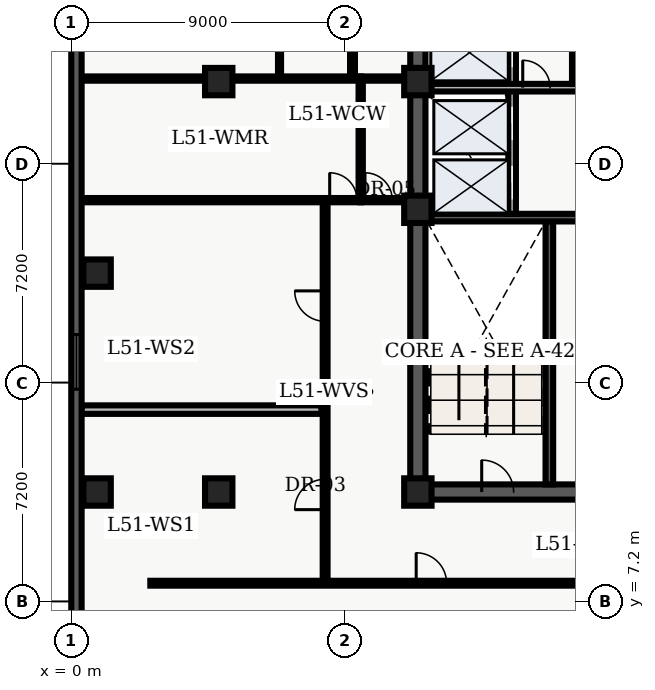
"""IFC4 building model, lengths in metres.
Left out: names, types, materials, properties, quantities, classifications, styles, units other than length and angle.
Written with IfcOpenShell. Run it as: python <this file> out.ifc"""

import sys

from ifc_helpers import new_model, entity, si_unit, converted_unit, direction, frame, origin_with_axes, origin_2d_with_axis, place, context, subcontext, project, spatial, polyline, rectangle, outline, extrude, element, fill, save


model = new_model("IFC4")
c1 = context("Model", 3, precision=1e-05, world=origin_with_axes(), true_north=direction((0.0, 1.0)))
c2 = subcontext(c1, "Body", "Model", "MODEL_VIEW")
j1 = project(units=[si_unit("LENGTHUNIT", "METRE"), converted_unit("PLANEANGLEUNIT", "DEGREE", entity("IfcPlaneAngleMeasure", 0.017), si_unit("PLANEANGLEUNIT", "RADIAN"), dimensions=[0, 0, 0, 0, 0, 0, 0])], contexts=[c1])
p1 = place(None, origin_with_axes())
s1 = spatial("IfcSite", under=j1, at=p1, CompositionType="ELEMENT")
p2 = place(p1, origin_with_axes())
s2 = spatial("IfcBuilding", under=s1, at=p2, CompositionType="ELEMENT")
p3 = place(p2, frame((0.0, 0.0, 208.2), z_axis=(0.0, 0.0, 1.0), x_axis=(1.0, 0.0, 0.0)))
s3 = spatial("IfcBuildingStorey", under=s2, at=p3, CompositionType="ELEMENT", Elevation=208.2)
p4 = place(p3, frame((11.4, 10.8, 0.0), z_axis=(0.0, 0.0, 1.0), x_axis=(0.0, 1.0, 0.0)))
e1 = element("IfcWall", 1, at=p4, inside=s3, PredefinedType="SHEAR", context=c2, shape_type="SweptSolid", body=[
    extrude(outline(polyline([(0.0, -0.25), (27.0, -0.25), (27.0, 0.25), (0.0, 0.25), (0.0, -0.25)])), origin_with_axes(), (0.0, 0.0, 1.0), 3.66),
])
p5 = place(p3, frame((11.4, 10.8, 0.0), z_axis=(0.0, 0.0, 1.0), x_axis=(1.0, 0.0, 0.0)))
e2 = element("IfcWall", 2, at=p5, inside=s3, PredefinedType="SHEAR", context=c2, shape_type="SweptSolid", body=[
    extrude(outline(polyline([(0.0, -0.25), (7.2, -0.25), (7.2, 0.25), (0.0, 0.25), (0.0, -0.25)])), origin_with_axes(), (0.0, 0.0, 1.0), 3.66),
])
p6 = place(p5, frame((2.625, 0.0, 0.0), z_axis=(0.0, 0.0, 1.0), x_axis=(1.0, 0.0, 0.0)))
e3 = element("IfcOpeningElement", 3, at=p6, cuts=e2, PredefinedType="OPENING", context=c2, shape_type="SweptSolid", body=[
    extrude(rectangle(XDim=1.05, YDim=0.52, at=origin_2d_with_axis()), origin_with_axes(), (0.0, 0.0, 1.0), 2.15),
])
p7 = place(p3, frame((15.725, 11.05, 0.0), z_axis=(0.0, 0.0, 1.0), x_axis=(0.0, 1.0, 0.0)))
e4 = element("IfcWall", 4, at=p7, inside=s3, PredefinedType="SHEAR", context=c2, shape_type="SweptSolid", body=[
    extrude(outline(polyline([(0.0, -0.125), (8.65, -0.125), (8.65, 0.125), (0.0, 0.125), (0.0, -0.125)])), origin_with_axes(), (0.0, 0.0, 1.0), 3.66),
])
p8 = place(p3, frame((11.65, 19.825, 0.0), z_axis=(0.0, 0.0, 1.0), x_axis=(1.0, 0.0, 0.0)))
e5 = element("IfcWall", 5, at=p8, inside=s3, PredefinedType="SHEAR", context=c2, shape_type="SweptSolid", body=[
    extrude(outline(polyline([(0.0, -0.125), (6.7, -0.125), (6.7, 0.125), (0.0, 0.125), (0.0, -0.125)])), origin_with_axes(), (0.0, 0.0, 1.0), 3.66),
])
p9 = place(p3, frame((14.5, 19.95, 0.0), z_axis=(0.0, 0.0, 1.0), x_axis=(0.0, 1.0, 0.0)))
e6 = element("IfcWall", 6, at=p9, inside=s3, PredefinedType="SOLIDWALL", context=c2, shape_type="SweptSolid", body=[
    extrude(outline(polyline([(0.0, -0.125), (6.25, -0.125), (6.25, 0.125), (0.0, 0.125), (0.0, -0.125)])), origin_with_axes(), (0.0, 0.0, 1.0), 2.7),
])
p10 = place(p9, frame((1.025, 0.0, 0.0), z_axis=(0.0, 0.0, 1.0), x_axis=(1.0, 0.0, 0.0)))
e7 = element("IfcOpeningElement", 7, at=p10, cuts=e6, PredefinedType="OPENING", context=c2, shape_type="SweptSolid", body=[
    extrude(rectangle(XDim=1.1, YDim=0.27, at=origin_2d_with_axis()), origin_with_axes(), (0.0, 0.0, 1.0), 2.15),
])
p11 = place(p9, frame((2.975, 0.0, 0.0), z_axis=(0.0, 0.0, 1.0), x_axis=(1.0, 0.0, 0.0)))
e8 = element("IfcOpeningElement", 8, at=p11, cuts=e6, PredefinedType="OPENING", context=c2, shape_type="SweptSolid", body=[
    extrude(rectangle(XDim=1.1, YDim=0.27, at=origin_2d_with_axis()), origin_with_axes(), (0.0, 0.0, 1.0), 2.15),
])
p12 = place(p9, frame((5.425, 0.0, 0.0), z_axis=(0.0, 0.0, 1.0), x_axis=(1.0, 0.0, 0.0)))
e9 = element("IfcOpeningElement", 9, at=p12, cuts=e6, PredefinedType="OPENING", context=c2, shape_type="SweptSolid", body=[
    extrude(rectangle(XDim=1.2, YDim=0.27, at=origin_2d_with_axis()), origin_with_axes(), (0.0, 0.0, 1.0), 2.15),
])
p13 = place(p3, frame((11.7, 24.1, 0.0), z_axis=(0.0, 0.0, 1.0), x_axis=(1.0, 0.0, 0.0)))
e10 = element("IfcWall", 10, at=p13, inside=s3, PredefinedType="SOLIDWALL", context=c2, shape_type="SweptSolid", body=[
    extrude(outline(polyline([(0.0, -0.125), (6.6, -0.125), (6.6, 0.125), (0.0, 0.125), (0.0, -0.125)])), origin_with_axes(), (0.0, 0.0, 1.0), 2.7),
])
p14 = place(p13, frame((3.6, 0.0, 0.0), z_axis=(0.0, 0.0, 1.0), x_axis=(1.0, 0.0, 0.0)))
e11 = element("IfcOpeningElement", 11, at=p14, cuts=e10, PredefinedType="OPENING", context=c2, shape_type="SweptSolid", body=[
    extrude(rectangle(XDim=0.9, YDim=0.27, at=origin_2d_with_axis()), origin_with_axes(), (0.0, 0.0, 1.0), 2.15),
])
p15 = place(p13, frame((5.65, 0.0, 0.0), z_axis=(0.0, 0.0, 1.0), x_axis=(1.0, 0.0, 0.0)))
e12 = element("IfcOpeningElement", 12, at=p15, cuts=e10, PredefinedType="OPENING", context=c2, shape_type="SweptSolid", body=[
    extrude(rectangle(XDim=0.9, YDim=0.27, at=origin_2d_with_axis()), origin_with_axes(), (0.0, 0.0, 1.0), 2.15),
])
for number, where, z_axis, x_axis in (
    (13, (11.4, 10.8, 0.0), (0.0, 0.0, 1.0), (1.0, 0.0, 0.0)),
    (14, (11.4, 20.1, 0.0), (0.0, 0.0, 1.0), (1.0, 0.0, 0.0)),
    (15, (11.4, 24.3, 0.0), (0.0, 0.0, 1.0), (1.0, 0.0, 0.0)),
    (16, (4.85, 10.8, 0.0), (0.0, 0.0, 1.0), (1.0, 0.0, 0.0)),
    (17, (4.85, 24.3, 0.0), (0.0, 0.0, 1.0), (1.0, 0.0, 0.0)),
    (18, (0.85, 10.8, 0.0), (0.0, 0.0, 1.0), (1.0, 0.0, 0.0)),
    (19, (0.85, 18.0, 0.0), (0.0, 0.0, 1.0), (1.0, 0.0, 0.0)),
):
    element("IfcColumn", number, at=place(p3, frame(where, z_axis=z_axis, x_axis=x_axis)), inside=s3, PredefinedType="COLUMN", context=c2, shape_type="SweptSolid", body=[
        extrude(rectangle(XDim=0.9, YDim=0.9, at=origin_2d_with_axis()), origin_with_axes(), (0.0, 0.0, 1.0), 3.9),
    ])
p16 = place(p3, frame((16.55, 24.22, 0.0), z_axis=(0.0, 0.0, 1.0), x_axis=(0.0, 1.0, 0.0)))
e20 = element("IfcWall", 20, at=p16, inside=s3, PredefinedType="PARTITIONING", context=c2, shape_type="SweptSolid", body=[
    extrude(outline(polyline([(0.0, -0.08), (1.98, -0.08), (1.98, 0.08), (0.0, 0.08), (0.0, -0.08)])), origin_with_axes(), (0.0, 0.0, 1.0), 2.7),
])
p17 = place(p3, frame((15.84, 15.35, 0.0), z_axis=(0.0, 0.0, 1.0), x_axis=(1.0, 0.0, 0.0)))
e21 = element("IfcWall", 21, at=p17, inside=s3, PredefinedType="PARTITIONING", context=c2, shape_type="SweptSolid", body=[
    extrude(outline(polyline([(0.0, -0.08), (2.46, -0.08), (2.46, 0.08), (0.0, 0.08), (0.0, -0.08)])), origin_with_axes(), (0.0, 0.0, 1.0), 2.7),
])
p18 = place(p3, frame((9.52, 20.4, 0.0), z_axis=(0.0, 0.0, 1.0), x_axis=(0.0, 1.0, 0.0)))
e22 = element("IfcWall", 22, at=p18, inside=s3, PredefinedType="PARTITIONING", context=c2, shape_type="SweptSolid", body=[
    extrude(outline(polyline([(0.0, -0.07), (4.0, -0.07), (4.0, 0.07), (0.0, 0.07), (0.0, -0.07)])), origin_with_axes(), (0.0, 0.0, 1.0), 2.7),
])
p19 = place(p3, frame((9.52, 20.4, 0.0), z_axis=(0.0, 0.0, 1.0), x_axis=(1.0, 0.0, 0.0)))
e23 = element("IfcWall", 23, at=p19, inside=s3, PredefinedType="PARTITIONING", context=c2, shape_type="SweptSolid", body=[
    extrude(outline(polyline([(0.0, -0.07), (1.58, -0.07), (1.58, 0.07), (0.0, 0.07), (0.0, -0.07)])), origin_with_axes(), (0.0, 0.0, 1.0), 2.7),
])
p20 = place(p19, frame((0.59, 0.0, 0.0), z_axis=(0.0, 0.0, 1.0), x_axis=(1.0, 0.0, 0.0)))
e24 = element("IfcOpeningElement", 24, at=p20, cuts=e23, PredefinedType="OPENING", context=c2, shape_type="SweptSolid", body=[
    extrude(rectangle(XDim=0.9, YDim=0.16, at=origin_2d_with_axis()), origin_with_axes(), (0.0, 0.0, 1.0), 2.15),
])
p21 = place(p3, frame((9.52, 24.4, 0.0), z_axis=(0.0, 0.0, 1.0), x_axis=(1.0, 0.0, 0.0)))
e25 = element("IfcWall", 25, at=p21, inside=s3, PredefinedType="PARTITIONING", context=c2, shape_type="SweptSolid", body=[
    extrude(outline(polyline([(0.0, -0.07), (1.58, -0.07), (1.58, 0.07), (0.0, 0.07), (0.0, -0.07)])), origin_with_axes(), (0.0, 0.0, 1.0), 2.7),
])
p22 = place(p3, frame((2.6, 7.8, 0.0), z_axis=(0.0, 0.0, 1.0), x_axis=(1.0, 0.0, 0.0)))
e26 = element("IfcWall", 26, at=p22, inside=s3, PredefinedType="PARTITIONING", context=c2, shape_type="SweptSolid", body=[
    extrude(outline(polyline([(0.0, -0.08), (18.55, -0.08), (18.55, 0.08), (0.0, 0.08), (0.0, -0.08)])), origin_with_axes(), (0.0, 0.0, 1.0), 2.7),
])
p23 = place(p22, frame((9.245, 0.0, 0.0), z_axis=(0.0, 0.0, 1.0), x_axis=(1.0, 0.0, 0.0)))
e27 = element("IfcOpeningElement", 27, at=p23, cuts=e26, PredefinedType="OPENING", context=c2, shape_type="SweptSolid", body=[
    extrude(rectangle(XDim=1.0, YDim=0.18, at=origin_2d_with_axis()), origin_with_axes(), (0.0, 0.0, 1.0), 2.15),
])
p24 = place(p3, frame((8.35, 7.8, 0.0), z_axis=(0.0, 0.0, 1.0), x_axis=(0.0, 1.0, 0.0)))
e28 = element("IfcWall", 28, at=p24, inside=s3, PredefinedType="PARTITIONING", context=c2, shape_type="SweptSolid", body=[
    extrude(outline(polyline([(0.0, -0.08), (12.6, -0.08), (12.6, 0.08), (0.0, 0.08), (0.0, -0.08)])), origin_with_axes(), (0.0, 0.0, 1.0), 2.7),
])
p25 = place(p24, frame((2.92, 0.0, 0.0), z_axis=(0.0, 0.0, 1.0), x_axis=(1.0, 0.0, 0.0)))
e29 = element("IfcOpeningElement", 29, at=p25, cuts=e28, PredefinedType="OPENING", context=c2, shape_type="SweptSolid", body=[
    extrude(rectangle(XDim=1.0, YDim=0.18, at=origin_2d_with_axis()), origin_with_axes(), (0.0, 0.0, 1.0), 2.15),
])
p26 = place(p24, frame((9.115, 0.0, 0.0), z_axis=(0.0, 0.0, 1.0), x_axis=(1.0, 0.0, 0.0)))
e30 = element("IfcOpeningElement", 30, at=p26, cuts=e28, PredefinedType="OPENING", context=c2, shape_type="SweptSolid", body=[
    extrude(rectangle(XDim=1.0, YDim=0.18, at=origin_2d_with_axis()), origin_with_axes(), (0.0, 0.0, 1.0), 2.15),
])
p27 = place(p3, frame((9.25, 24.4, 0.0), z_axis=(0.0, 0.0, 1.0), x_axis=(0.0, 1.0, 0.0)))
e31 = element("IfcWall", 31, at=p27, inside=s3, PredefinedType="PARTITIONING", context=c2, shape_type="SweptSolid", body=[
    extrude(outline(polyline([(0.0, -0.08), (16.1, -0.08), (16.1, 0.08), (0.0, 0.08), (0.0, -0.08)])), origin_with_axes(), (0.0, 0.0, 1.0), 2.7),
])
p28 = place(p27, frame((5.51, 0.0, 0.0), z_axis=(0.0, 0.0, 1.0), x_axis=(1.0, 0.0, 0.0)))
e32 = element("IfcOpeningElement", 32, at=p28, cuts=e31, PredefinedType="OPENING", context=c2, shape_type="SweptSolid", body=[
    extrude(rectangle(XDim=1.0, YDim=0.18, at=origin_2d_with_axis()), origin_with_axes(), (0.0, 0.0, 1.0), 2.15),
])
p29 = place(p27, frame((13.455, 0.0, 0.0), z_axis=(0.0, 0.0, 1.0), x_axis=(1.0, 0.0, 0.0)))
e33 = element("IfcOpeningElement", 33, at=p29, cuts=e31, PredefinedType="OPENING", context=c2, shape_type="SweptSolid", body=[
    extrude(rectangle(XDim=1.0, YDim=0.18, at=origin_2d_with_axis()), origin_with_axes(), (0.0, 0.0, 1.0), 2.15),
])
p30 = place(p3, frame((0.335, 20.4, 0.0), z_axis=(0.0, 0.0, 1.0), x_axis=(1.0, 0.0, 0.0)))
e34 = element("IfcWall", 34, at=p30, inside=s3, PredefinedType="PARTITIONING", context=c2, shape_type="SweptSolid", body=[
    extrude(outline(polyline([(0.0, -0.07), (9.185, -0.07), (9.185, 0.07), (0.0, 0.07), (0.0, -0.07)])), origin_with_axes(), (0.0, 0.0, 1.0), 2.7),
])
p31 = place(p30, frame((8.615, 0.0, 0.0), z_axis=(0.0, 0.0, 1.0), x_axis=(1.0, 0.0, 0.0)))
e35 = element("IfcOpeningElement", 35, at=p31, cuts=e34, PredefinedType="OPENING", context=c2, shape_type="SweptSolid", body=[
    extrude(rectangle(XDim=0.9, YDim=0.16, at=origin_2d_with_axis()), origin_with_axes(), (0.0, 0.0, 1.0), 2.15),
])
p32 = place(p3, frame((0.335, 24.4, 0.0), z_axis=(0.0, 0.0, 1.0), x_axis=(1.0, 0.0, 0.0)))
e36 = element("IfcWall", 36, at=p32, inside=s3, PredefinedType="PARTITIONING", context=c2, shape_type="SweptSolid", body=[
    extrude(outline(polyline([(0.0, -0.07), (9.185, -0.07), (9.185, 0.07), (0.0, 0.07), (0.0, -0.07)])), origin_with_axes(), (0.0, 0.0, 1.0), 2.7),
])
p33 = place(p3, frame((0.335, 13.51, 0.0), z_axis=(0.0, 0.0, 1.0), x_axis=(1.0, 0.0, 0.0)))
e37 = element("IfcWall", 37, at=p33, inside=s3, PredefinedType="PARTITIONING", context=c2, shape_type="SweptSolid", body=[
    extrude(outline(polyline([(0.0, -0.14), (7.895, -0.14), (7.895, 0.14), (0.0, 0.14), (0.0, -0.14)])), origin_with_axes(), (0.0, 0.0, 1.0), 2.7),
])
p34 = place(p3, frame((6.85, 24.55, 0.0), z_axis=(0.0, 0.0, 1.0), x_axis=(0.0, 1.0, 0.0)))
e38 = element("IfcWall", 38, at=p34, inside=s3, PredefinedType="PARTITIONING", context=c2, shape_type="SweptSolid", body=[
    extrude(outline(polyline([(0.0, -0.05), (15.75, -0.05), (15.75, 0.05), (0.0, 0.05), (0.0, -0.05)])), origin_with_axes(), (0.0, 0.0, 1.0), 2.7),
])
p35 = place(p34, frame((5.36, 0.0, 0.0), z_axis=(0.0, 0.0, 1.0), x_axis=(1.0, 0.0, 0.0)))
e39 = element("IfcOpeningElement", 39, at=p35, cuts=e38, PredefinedType="OPENING", context=c2, shape_type="SweptSolid", body=[
    extrude(rectangle(XDim=0.95, YDim=0.12, at=origin_2d_with_axis()), origin_with_axes(), (0.0, 0.0, 1.0), 2.15),
])
p36 = place(p34, frame((13.305, 0.0, 0.0), z_axis=(0.0, 0.0, 1.0), x_axis=(1.0, 0.0, 0.0)))
e40 = element("IfcOpeningElement", 40, at=p36, cuts=e38, PredefinedType="OPENING", context=c2, shape_type="SweptSolid", body=[
    extrude(rectangle(XDim=0.95, YDim=0.12, at=origin_2d_with_axis()), origin_with_axes(), (0.0, 0.0, 1.0), 2.15),
])
p37 = place(p3, frame((0.17, 2.74, 0.0), z_axis=(0.0, 0.0, 1.0), x_axis=(0.0, 1.0, 0.0)))
e41 = element("IfcWall", 41, at=p37, inside=s3, PredefinedType="SOLIDWALL", context=c2, shape_type="SweptSolid", body=[
    extrude(outline(polyline([(0.0, -0.17), (43.46, -0.17), (43.46, 0.17), (0.0, 0.17), (0.0, -0.17)])), origin_with_axes(), (0.0, 0.0, 1.0), 3.66),
])
p38 = place(p37, frame((2.948, 0.0, 0.45), z_axis=(0.0, 0.0, 1.0), x_axis=(1.0, 0.0, 0.0)))
e42 = element("IfcOpeningElement", 42, at=p38, cuts=e41, PredefinedType="OPENING", context=c2, shape_type="SweptSolid", body=[
    extrude(rectangle(XDim=1.8, YDim=0.36, at=origin_2d_with_axis()), origin_with_axes(), (0.0, 0.0, 1.0), 2.1),
])
p39 = place(p37, frame((12.339, 0.0, 0.45), z_axis=(0.0, 0.0, 1.0), x_axis=(1.0, 0.0, 0.0)))
e43 = element("IfcOpeningElement", 43, at=p39, cuts=e41, PredefinedType="OPENING", context=c2, shape_type="SweptSolid", body=[
    extrude(rectangle(XDim=1.8, YDim=0.36, at=origin_2d_with_axis()), origin_with_axes(), (0.0, 0.0, 1.0), 2.1),
])
p40 = place(p37, frame((26.426, 0.0, 0.45), z_axis=(0.0, 0.0, 1.0), x_axis=(1.0, 0.0, 0.0)))
e44 = element("IfcOpeningElement", 44, at=p40, cuts=e41, PredefinedType="OPENING", context=c2, shape_type="SweptSolid", body=[
    extrude(rectangle(XDim=1.8, YDim=0.36, at=origin_2d_with_axis()), origin_with_axes(), (0.0, 0.0, 1.0), 2.1),
])
p41 = place(p37, frame((31.121, 0.0, 0.45), z_axis=(0.0, 0.0, 1.0), x_axis=(1.0, 0.0, 0.0)))
e45 = element("IfcOpeningElement", 45, at=p41, cuts=e41, PredefinedType="OPENING", context=c2, shape_type="SweptSolid", body=[
    extrude(rectangle(XDim=1.8, YDim=0.36, at=origin_2d_with_axis()), origin_with_axes(), (0.0, 0.0, 1.0), 2.1),
])
p42 = place(p37, frame((40.062, 0.0, 0.45), z_axis=(0.0, 0.0, 1.0), x_axis=(1.0, 0.0, 0.0)))
e46 = element("IfcOpeningElement", 46, at=p42, cuts=e41, PredefinedType="OPENING", context=c2, shape_type="SweptSolid", body=[
    extrude(rectangle(XDim=1.8, YDim=0.36, at=origin_2d_with_axis()), origin_with_axes(), (0.0, 0.0, 1.0), 2.1),
])
p43 = place(p9, frame((1.025, 0.0, 0.0), z_axis=(0.0, 0.0, 1.0), x_axis=(1.0, 0.0, 0.0)))
e47 = element("IfcDoor", 47, at=p43, inside=s3, OperationType="SLIDING_TO_LEFT", PredefinedType="DOOR", context=c2, shape_type="SweptSolid", body=[
    extrude(rectangle(XDim=1.1, YDim=0.09, at=origin_2d_with_axis()), origin_with_axes(), (0.0, 0.0, 1.0), 2.15),
])
fill(e7, e47)
p44 = place(p9, frame((2.975, 0.0, 0.0), z_axis=(0.0, 0.0, 1.0), x_axis=(1.0, 0.0, 0.0)))
e48 = element("IfcDoor", 48, at=p44, inside=s3, OperationType="SLIDING_TO_RIGHT", PredefinedType="DOOR", context=c2, shape_type="SweptSolid", body=[
    extrude(rectangle(XDim=1.1, YDim=0.09, at=origin_2d_with_axis()), origin_with_axes(), (0.0, 0.0, 1.0), 2.15),
])
fill(e8, e48)
p45 = place(p9, frame((5.425, 0.0, 0.0), z_axis=(0.0, 0.0, 1.0), x_axis=(1.0, 0.0, 0.0)))
e49 = element("IfcDoor", 49, at=p45, inside=s3, OperationType="DOUBLE_DOOR_SLIDING", PredefinedType="DOOR", context=c2, shape_type="SweptSolid", body=[
    extrude(rectangle(XDim=1.2, YDim=0.09, at=origin_2d_with_axis()), origin_with_axes(), (0.0, 0.0, 1.0), 2.15),
])
fill(e9, e49)
p46 = place(p5, frame((2.625, 0.0, 0.0), z_axis=(0.0, 0.0, 1.0), x_axis=(1.0, 0.0, 0.0)))
e50 = element("IfcDoor", 50, at=p46, inside=s3, OperationType="SINGLE_SWING_LEFT", PredefinedType="DOOR", context=c2, shape_type="SweptSolid", body=[
    extrude(rectangle(XDim=1.05, YDim=0.09, at=origin_2d_with_axis()), origin_with_axes(), (0.0, 0.0, 1.0), 2.15),
])
fill(e3, e50)
p47 = place(p13, frame((3.6, 0.0, 0.0), z_axis=(0.0, 0.0, 1.0), x_axis=(1.0, 0.0, 0.0)))
e51 = element("IfcDoor", 51, at=p47, inside=s3, OperationType="SINGLE_SWING_LEFT", PredefinedType="DOOR", context=c2, shape_type="SweptSolid", body=[
    extrude(rectangle(XDim=0.9, YDim=0.09, at=origin_2d_with_axis()), origin_with_axes(), (0.0, 0.0, 1.0), 2.15),
])
fill(e11, e51)
p48 = place(p19, frame((0.59, 0.0, 0.0), z_axis=(0.0, 0.0, 1.0), x_axis=(1.0, 0.0, 0.0)))
e52 = element("IfcDoor", 52, at=p48, inside=s3, OperationType="SINGLE_SWING_LEFT", PredefinedType="DOOR", context=c2, shape_type="SweptSolid", body=[
    extrude(rectangle(XDim=0.9, YDim=0.084, at=origin_2d_with_axis()), origin_with_axes(), (0.0, 0.0, 1.0), 2.15),
])
fill(e24, e52)
p49 = place(p30, frame((8.615, 0.0, 0.0), z_axis=(0.0, 0.0, 1.0), x_axis=(1.0, 0.0, 0.0)))
e53 = element("IfcDoor", 53, at=p49, inside=s3, OperationType="SINGLE_SWING_LEFT", PredefinedType="DOOR", context=c2, shape_type="SweptSolid", body=[
    extrude(rectangle(XDim=0.9, YDim=0.084, at=origin_2d_with_axis()), origin_with_axes(), (0.0, 0.0, 1.0), 2.15),
])
fill(e35, e53)
p50 = place(p24, frame((2.92, 0.0, 0.0), z_axis=(0.0, 0.0, 1.0), x_axis=(1.0, 0.0, 0.0)))
e54 = element("IfcDoor", 54, at=p50, inside=s3, OperationType="SINGLE_SWING_LEFT", PredefinedType="DOOR", context=c2, shape_type="SweptSolid", body=[
    extrude(rectangle(XDim=1.0, YDim=0.09, at=origin_2d_with_axis()), origin_with_axes(), (0.0, 0.0, 1.0), 2.15),
])
fill(e29, e54)
p51 = place(p24, frame((9.115, 0.0, 0.0), z_axis=(0.0, 0.0, 1.0), x_axis=(1.0, 0.0, 0.0)))
e55 = element("IfcDoor", 55, at=p51, inside=s3, OperationType="SINGLE_SWING_RIGHT", PredefinedType="DOOR", context=c2, shape_type="SweptSolid", body=[
    extrude(rectangle(XDim=1.0, YDim=0.09, at=origin_2d_with_axis()), origin_with_axes(), (0.0, 0.0, 1.0), 2.15),
])
fill(e30, e55)
p52 = place(p22, frame((9.245, 0.0, 0.0), z_axis=(0.0, 0.0, 1.0), x_axis=(1.0, 0.0, 0.0)))
e56 = element("IfcDoor", 56, at=p52, inside=s3, OperationType="SINGLE_SWING_LEFT", PredefinedType="DOOR", context=c2, shape_type="SweptSolid", body=[
    extrude(rectangle(XDim=1.0, YDim=0.09, at=origin_2d_with_axis()), origin_with_axes(), (0.0, 0.0, 1.0), 2.15),
])
fill(e27, e56)
p53 = place(p37, frame((12.339, 0.0, 0.45), z_axis=(0.0, 0.0, 1.0), x_axis=(1.0, 0.0, 0.0)))
e57 = element("IfcWindow", 57, at=p53, inside=s3, PredefinedType="WINDOW", context=c2, shape_type="SweptSolid", body=[
    extrude(rectangle(XDim=1.8, YDim=0.09, at=origin_2d_with_axis()), origin_with_axes(), (0.0, 0.0, 1.0), 2.1),
])
fill(e43, e57)
save(model, sys.argv[1])
